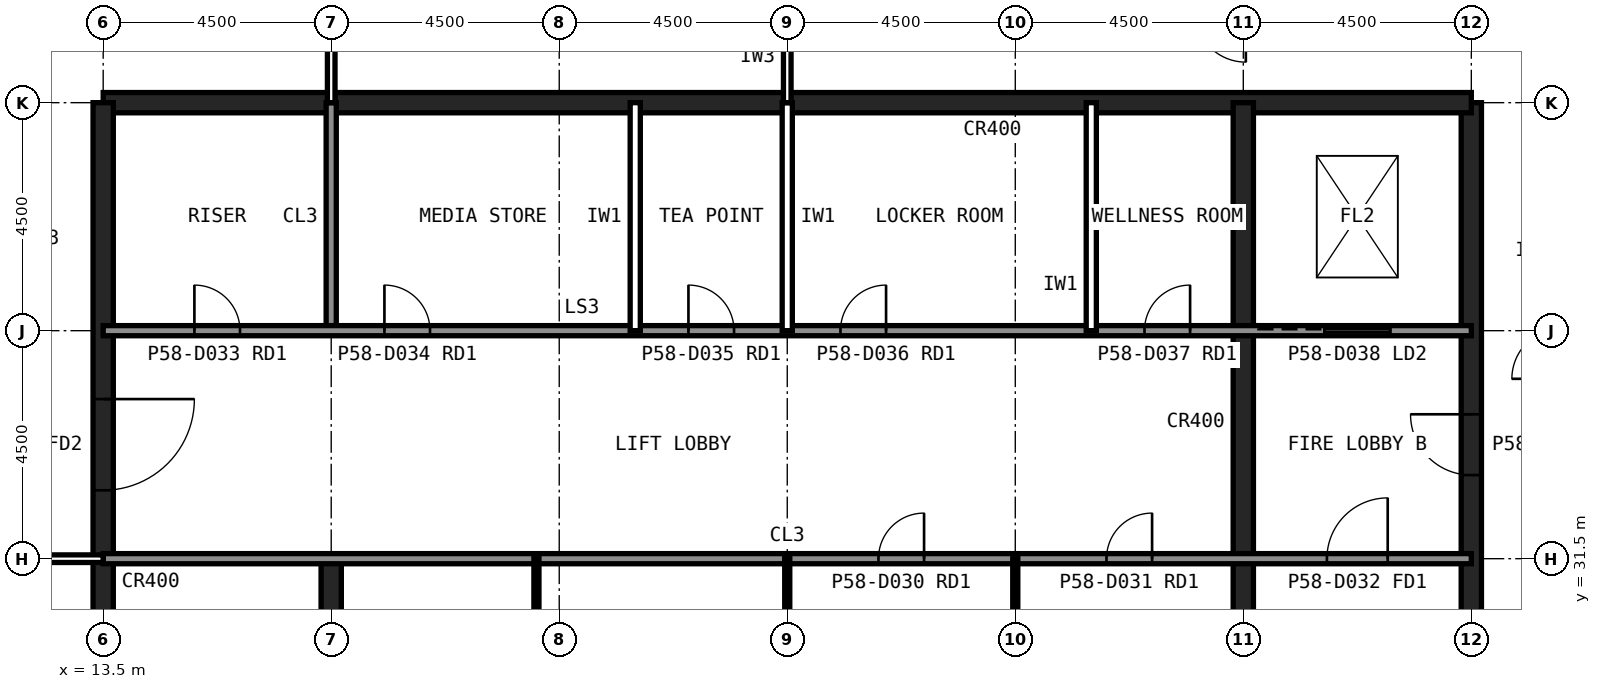
"""IFC4 building model, lengths in metres.
Left out: names, types, materials, properties, quantities, classifications, styles, units other than length and angle.
Written with IfcOpenShell. Run it as: python <this file> out.ifc"""

import sys

from ifc_helpers import new_model, si_unit, direction, frame, frame_2d, origin, place, context, subcontext, project, spatial, rectangle, extrude, element, fill, save


model = new_model("IFC4")
c1 = context("Model", 3, precision=1e-05, world=origin(), true_north=direction((0.0, 1.0)))
c2 = subcontext(c1, "Body", "Model", "MODEL_VIEW")
j1 = project(units=[si_unit("LENGTHUNIT", "METRE"), si_unit("PLANEANGLEUNIT", "RADIAN")], contexts=[c1])
p1 = place(None, origin())
s1 = spatial("IfcSite", under=j1, at=p1, CompositionType="ELEMENT")
p2 = place(p1, origin())
s2 = spatial("IfcBuilding", under=s1, at=p2, CompositionType="ELEMENT")
p3 = place(p2, frame((0.0, 0.0, 246.6)))
s3 = spatial("IfcBuildingStorey", under=s2, at=p3, CompositionType="ELEMENT", Elevation=246.6)
p4 = place(p3, frame((40.5, 13.5, 0.0), z_axis=(0.0, 0.0, 1.0), x_axis=(0.0, 1.0, 0.0)))
e1 = element("IfcWall", 1, at=p4, inside=s3, PredefinedType="SHEAR", context=c2, shape_type="SweptSolid", body=[
    extrude(rectangle(XDim=27.0, YDim=0.4, at=frame_2d((13.5, 0.0))), origin(), (0.0, 0.0, 1.0), 4.0),
])
p5 = place(p4, frame((5.85, 0.0, 0.0)))
e2 = element("IfcOpeningElement", 2, at=p5, cuts=e1, PredefinedType="OPENING", context=c2, shape_type="SweptSolid", body=[
    extrude(rectangle(XDim=1.8, YDim=2.1, at=frame_2d((0.9, 1.05))), frame((0.0, 0.21, 0.0), z_axis=(0.0, -1.0, 0.0), x_axis=(1.0, 0.0, 0.0)), (0.0, 0.0, 1.0), 0.42),
])
p6 = place(p4, frame((19.65, 0.0, 0.0)))
e3 = element("IfcOpeningElement", 3, at=p6, cuts=e1, PredefinedType="OPENING", context=c2, shape_type="SweptSolid", body=[
    extrude(rectangle(XDim=1.2, YDim=2.1, at=frame_2d((0.6, 1.05))), frame((0.0, 0.21, 0.0), z_axis=(0.0, -1.0, 0.0), x_axis=(1.0, 0.0, 0.0)), (0.0, 0.0, 1.0), 0.42),
])
p7 = place(p3, frame((40.5, 40.5, 0.0), z_axis=(0.0, 0.0, 1.0), x_axis=(-1.0, 0.0, 0.0)))
e4 = element("IfcWall", 4, at=p7, inside=s3, PredefinedType="SHEAR", context=c2, shape_type="SweptSolid", body=[
    extrude(rectangle(XDim=27.0, YDim=0.4, at=frame_2d((13.5, 0.0))), origin(), (0.0, 0.0, 1.0), 4.0),
])
p8 = place(p3, frame((13.5, 40.5, 0.0), z_axis=(0.0, 0.0, 1.0), x_axis=(0.0, -1.0, 0.0)))
e5 = element("IfcWall", 5, at=p8, inside=s3, PredefinedType="SHEAR", context=c2, shape_type="SweptSolid", body=[
    extrude(rectangle(XDim=27.0, YDim=0.4, at=frame_2d((13.5, 0.0))), origin(), (0.0, 0.0, 1.0), 4.0),
])
p9 = place(p8, frame((19.65, 0.0, 0.0)))
e6 = element("IfcOpeningElement", 6, at=p9, cuts=e5, PredefinedType="OPENING", context=c2, shape_type="SweptSolid", body=[
    extrude(rectangle(XDim=1.2, YDim=2.1, at=frame_2d((0.6, 1.05))), frame((0.0, 0.21, 0.0), z_axis=(0.0, -1.0, 0.0), x_axis=(1.0, 0.0, 0.0)), (0.0, 0.0, 1.0), 0.42),
])
p10 = place(p8, frame((5.85, 0.0, 0.0)))
e7 = element("IfcOpeningElement", 7, at=p10, cuts=e5, PredefinedType="OPENING", context=c2, shape_type="SweptSolid", body=[
    extrude(rectangle(XDim=1.8, YDim=2.1, at=frame_2d((0.9, 1.05))), frame((0.0, 0.21, 0.0), z_axis=(0.0, -1.0, 0.0), x_axis=(1.0, 0.0, 0.0)), (0.0, 0.0, 1.0), 0.42),
])
p11 = place(p3, frame((18.0, 13.5, 0.0), z_axis=(0.0, 0.0, 1.0), x_axis=(0.0, 1.0, 0.0)))
e8 = element("IfcWall", 8, at=p11, inside=s3, PredefinedType="SHEAR", context=c2, shape_type="SweptSolid", body=[
    extrude(rectangle(XDim=18.0, YDim=0.4, at=frame_2d((9.0, 0.0))), origin(), (0.0, 0.0, 1.0), 4.0),
])
p12 = place(p3, frame((18.0, 36.0, 0.0), z_axis=(0.0, 0.0, 1.0), x_axis=(0.0, 1.0, 0.0)))
e9 = element("IfcWall", 9, at=p12, inside=s3, PredefinedType="SOLIDWALL", context=c2, shape_type="SweptSolid", body=[
    extrude(rectangle(XDim=4.5, YDim=0.2, at=frame_2d((2.25, 0.0))), origin(), (0.0, 0.0, 1.0), 3.84),
])
p13 = place(p3, frame((36.0, 22.5, 0.0), z_axis=(0.0, 0.0, 1.0), x_axis=(0.0, 1.0, 0.0)))
e10 = element("IfcWall", 10, at=p13, inside=s3, PredefinedType="SHEAR", context=c2, shape_type="SweptSolid", body=[
    extrude(rectangle(XDim=18.0, YDim=0.4, at=frame_2d((9.0, 0.0))), origin(), (0.0, 0.0, 1.0), 4.0),
])
p14 = place(p3, frame((13.5, 36.0, 0.0), z_axis=(0.0, 0.0, 1.0), x_axis=(1.0, 0.0, 0.0)))
e11 = element("IfcWall", 11, at=p14, inside=s3, PredefinedType="SOLIDWALL", context=c2, shape_type="SweptSolid", body=[
    extrude(rectangle(XDim=27.0, YDim=0.2, at=frame_2d((13.5, 0.0))), origin(), (0.0, 0.0, 1.0), 3.84),
])
p15 = place(p14, frame((1.8, 0.0, 0.0)))
e12 = element("IfcOpeningElement", 12, at=p15, cuts=e11, PredefinedType="OPENING", context=c2, shape_type="SweptSolid", body=[
    extrude(rectangle(XDim=0.9, YDim=2.1, at=frame_2d((0.45, 1.05))), frame((0.0, 0.11, 0.0), z_axis=(0.0, -1.0, 0.0), x_axis=(1.0, 0.0, 0.0)), (0.0, 0.0, 1.0), 0.22),
])
p16 = place(p14, frame((5.55, 0.0, 0.0)))
e13 = element("IfcOpeningElement", 13, at=p16, cuts=e11, PredefinedType="OPENING", context=c2, shape_type="SweptSolid", body=[
    extrude(rectangle(XDim=0.9, YDim=2.1, at=frame_2d((0.45, 1.05))), frame((0.0, 0.11, 0.0), z_axis=(0.0, -1.0, 0.0), x_axis=(1.0, 0.0, 0.0)), (0.0, 0.0, 1.0), 0.22),
])
p17 = place(p14, frame((11.55, 0.0, 0.0)))
e14 = element("IfcOpeningElement", 14, at=p17, cuts=e11, PredefinedType="OPENING", context=c2, shape_type="SweptSolid", body=[
    extrude(rectangle(XDim=0.9, YDim=2.1, at=frame_2d((0.45, 1.05))), frame((0.0, 0.11, 0.0), z_axis=(0.0, -1.0, 0.0), x_axis=(1.0, 0.0, 0.0)), (0.0, 0.0, 1.0), 0.22),
])
p18 = place(p14, frame((14.55, 0.0, 0.0)))
e15 = element("IfcOpeningElement", 15, at=p18, cuts=e11, PredefinedType="OPENING", context=c2, shape_type="SweptSolid", body=[
    extrude(rectangle(XDim=0.9, YDim=2.1, at=frame_2d((0.45, 1.05))), frame((0.0, 0.11, 0.0), z_axis=(0.0, -1.0, 0.0), x_axis=(1.0, 0.0, 0.0)), (0.0, 0.0, 1.0), 0.22),
])
p19 = place(p14, frame((20.55, 0.0, 0.0)))
e16 = element("IfcOpeningElement", 16, at=p19, cuts=e11, PredefinedType="OPENING", context=c2, shape_type="SweptSolid", body=[
    extrude(rectangle(XDim=0.9, YDim=2.1, at=frame_2d((0.45, 1.05))), frame((0.0, 0.11, 0.0), z_axis=(0.0, -1.0, 0.0), x_axis=(1.0, 0.0, 0.0)), (0.0, 0.0, 1.0), 0.22),
])
p20 = place(p14, frame((24.1, 0.0, 0.0)))
e17 = element("IfcOpeningElement", 17, at=p20, cuts=e11, PredefinedType="OPENING", context=c2, shape_type="SweptSolid", body=[
    extrude(rectangle(XDim=1.3, YDim=2.2, at=frame_2d((0.65, 1.1))), frame((0.0, 0.11, 0.0), z_axis=(0.0, -1.0, 0.0), x_axis=(1.0, 0.0, 0.0)), (0.0, 0.0, 1.0), 0.22),
])
p21 = place(p3, frame((13.5, 31.5, 0.0), z_axis=(0.0, 0.0, 1.0), x_axis=(1.0, 0.0, 0.0)))
e18 = element("IfcWall", 18, at=p21, inside=s3, PredefinedType="SOLIDWALL", context=c2, shape_type="SweptSolid", body=[
    extrude(rectangle(XDim=27.0, YDim=0.2, at=frame_2d((13.5, 0.0))), origin(), (0.0, 0.0, 1.0), 3.84),
])
p22 = place(p21, frame((24.15, 0.0, 0.0)))
e19 = element("IfcOpeningElement", 19, at=p22, cuts=e18, PredefinedType="OPENING", context=c2, shape_type="SweptSolid", body=[
    extrude(rectangle(XDim=1.2, YDim=2.1, at=frame_2d((0.6, 1.05))), frame((0.0, 0.11, 0.0), z_axis=(0.0, -1.0, 0.0), x_axis=(1.0, 0.0, 0.0)), (0.0, 0.0, 1.0), 0.22),
])
p23 = place(p21, frame((15.3, 0.0, 0.0)))
e20 = element("IfcOpeningElement", 20, at=p23, cuts=e18, PredefinedType="OPENING", context=c2, shape_type="SweptSolid", body=[
    extrude(rectangle(XDim=0.9, YDim=2.1, at=frame_2d((0.45, 1.05))), frame((0.0, 0.11, 0.0), z_axis=(0.0, -1.0, 0.0), x_axis=(1.0, 0.0, 0.0)), (0.0, 0.0, 1.0), 0.22),
])
p24 = place(p21, frame((19.8, 0.0, 0.0)))
e21 = element("IfcOpeningElement", 21, at=p24, cuts=e18, PredefinedType="OPENING", context=c2, shape_type="SweptSolid", body=[
    extrude(rectangle(XDim=0.9, YDim=2.1, at=frame_2d((0.45, 1.05))), frame((0.0, 0.11, 0.0), z_axis=(0.0, -1.0, 0.0), x_axis=(1.0, 0.0, 0.0)), (0.0, 0.0, 1.0), 0.22),
])
for number, where, z_axis, x_axis in (
    (22, (24.0, 36.0, 0.0), (0.0, 0.0, 1.0), (0.0, 1.0, 0.0)),
    (23, (27.0, 36.0, 0.0), (0.0, 0.0, 1.0), (0.0, 1.0, 0.0)),
    (24, (33.0, 36.0, 0.0), (0.0, 0.0, 1.0), (0.0, 1.0, 0.0)),
):
    element("IfcWall", number, at=place(p3, frame(where, z_axis=z_axis, x_axis=x_axis)), inside=s3, PredefinedType="PARTITIONING", context=c2, shape_type="SweptSolid", body=[
        extrude(rectangle(XDim=4.5, YDim=0.2, at=frame_2d((2.25, 0.0))), origin(), (0.0, 0.0, 1.0), 3.84),
    ])
for number, where, z_axis, x_axis in (
    (25, (22.05, 22.5, 0.0), (0.0, 0.0, 1.0), (0.0, 1.0, 0.0)),
    (26, (27.0, 22.5, 0.0), (0.0, 0.0, 1.0), (0.0, 1.0, 0.0)),
    (27, (31.5, 22.5, 0.0), (0.0, 0.0, 1.0), (0.0, 1.0, 0.0)),
):
    element("IfcWall", number, at=place(p3, frame(where, z_axis=z_axis, x_axis=x_axis)), inside=s3, PredefinedType="PLUMBINGWALL", context=c2, shape_type="SweptSolid", body=[
        extrude(rectangle(XDim=9.0, YDim=0.1, at=frame_2d((4.5, 0.0))), origin(), (0.0, 0.0, 1.0), 3.84),
    ])
p25 = place(p3, frame((27.0, 40.5, 0.0), z_axis=(0.0, 0.0, 1.0), x_axis=(0.0, 1.0, 0.0)))
e28 = element("IfcWall", 28, at=p25, inside=s3, PredefinedType="PARTITIONING", context=c2, shape_type="SweptSolid", body=[
    extrude(rectangle(XDim=4.5, YDim=0.15, at=frame_2d((2.25, 0.0))), origin(), (0.0, 0.0, 1.0), 2.989),
])
p26 = place(p25, frame((1.75, 0.0, 0.0)))
e29 = element("IfcOpeningElement", 29, at=p26, cuts=e28, PredefinedType="OPENING", context=c2, shape_type="SweptSolid", body=[
    extrude(rectangle(XDim=1.0, YDim=2.1, at=frame_2d((0.5, 1.05))), frame((0.0, 0.085, 0.0), z_axis=(0.0, -1.0, 0.0), x_axis=(1.0, 0.0, 0.0)), (0.0, 0.0, 1.0), 0.17),
])
p27 = place(p3, frame((18.0, 45.0, 0.0), z_axis=(0.0, 0.0, 1.0), x_axis=(0.0, -1.0, 0.0)))
e30 = element("IfcWall", 30, at=p27, inside=s3, PredefinedType="PARTITIONING", context=c2, shape_type="SweptSolid", body=[
    extrude(rectangle(XDim=4.5, YDim=0.15, at=frame_2d((2.25, 0.0))), origin(), (0.0, 0.0, 1.0), 2.989),
])
p28 = place(p3, frame((13.5, 31.5, 0.0), z_axis=(0.0, 0.0, 1.0), x_axis=(-1.0, 0.0, 0.0)))
e31 = element("IfcWall", 31, at=p28, inside=s3, PredefinedType="PARTITIONING", context=c2, shape_type="SweptSolid", body=[
    extrude(rectangle(XDim=3.6, YDim=0.15, at=frame_2d((1.8, 0.0))), origin(), (0.0, 0.0, 1.0), 2.989),
])
p29 = place(p10, origin())
e32 = element("IfcDoor", 32, at=p29, inside=s3, OperationType="SINGLE_SWING_LEFT", PredefinedType="DOOR", context=c2, shape_type="SweptSolid", body=[
    extrude(rectangle(XDim=1.8, YDim=2.1, at=frame_2d((0.9, 1.05))), frame((0.0, 0.025, 0.0), z_axis=(0.0, -1.0, 0.0), x_axis=(1.0, 0.0, 0.0)), (0.0, 0.0, 1.0), 0.05),
])
fill(e7, e32)
p30 = place(p6, origin())
e33 = element("IfcDoor", 33, at=p30, inside=s3, OperationType="SINGLE_SWING_RIGHT", PredefinedType="DOOR", context=c2, shape_type="SweptSolid", body=[
    extrude(rectangle(XDim=1.2, YDim=2.1, at=frame_2d((0.6, 1.05))), frame((0.0, 0.025, 0.0), z_axis=(0.0, -1.0, 0.0), x_axis=(1.0, 0.0, 0.0)), (0.0, 0.0, 1.0), 0.05),
])
fill(e3, e33)
p31 = place(p22, origin())
e34 = element("IfcDoor", 34, at=p31, inside=s3, OperationType="SINGLE_SWING_RIGHT", PredefinedType="DOOR", context=c2, shape_type="SweptSolid", body=[
    extrude(rectangle(XDim=1.2, YDim=2.1, at=frame_2d((0.6, 1.05))), frame((0.0, 0.025, 0.0), z_axis=(0.0, -1.0, 0.0), x_axis=(1.0, 0.0, 0.0)), (0.0, 0.0, 1.0), 0.05),
])
fill(e19, e34)
p32 = place(p23, origin())
e35 = element("IfcDoor", 35, at=p32, inside=s3, OperationType="SINGLE_SWING_RIGHT", PredefinedType="DOOR", context=c2, shape_type="SweptSolid", body=[
    extrude(rectangle(XDim=0.9, YDim=2.1, at=frame_2d((0.45, 1.05))), frame((0.0, 0.025, 0.0), z_axis=(0.0, -1.0, 0.0), x_axis=(1.0, 0.0, 0.0)), (0.0, 0.0, 1.0), 0.05),
])
fill(e20, e35)
p33 = place(p24, origin())
e36 = element("IfcDoor", 36, at=p33, inside=s3, OperationType="SINGLE_SWING_RIGHT", PredefinedType="DOOR", context=c2, shape_type="SweptSolid", body=[
    extrude(rectangle(XDim=0.9, YDim=2.1, at=frame_2d((0.45, 1.05))), frame((0.0, 0.025, 0.0), z_axis=(0.0, -1.0, 0.0), x_axis=(1.0, 0.0, 0.0)), (0.0, 0.0, 1.0), 0.05),
])
fill(e21, e36)
p34 = place(p15, origin())
e37 = element("IfcDoor", 37, at=p34, inside=s3, OperationType="SINGLE_SWING_LEFT", PredefinedType="DOOR", context=c2, shape_type="SweptSolid", body=[
    extrude(rectangle(XDim=0.9, YDim=2.1, at=frame_2d((0.45, 1.05))), frame((0.0, 0.025, 0.0), z_axis=(0.0, -1.0, 0.0), x_axis=(1.0, 0.0, 0.0)), (0.0, 0.0, 1.0), 0.05),
])
fill(e12, e37)
p35 = place(p16, origin())
e38 = element("IfcDoor", 38, at=p35, inside=s3, OperationType="SINGLE_SWING_LEFT", PredefinedType="DOOR", context=c2, shape_type="SweptSolid", body=[
    extrude(rectangle(XDim=0.9, YDim=2.1, at=frame_2d((0.45, 1.05))), frame((0.0, 0.025, 0.0), z_axis=(0.0, -1.0, 0.0), x_axis=(1.0, 0.0, 0.0)), (0.0, 0.0, 1.0), 0.05),
])
fill(e13, e38)
p36 = place(p17, origin())
e39 = element("IfcDoor", 39, at=p36, inside=s3, OperationType="SINGLE_SWING_LEFT", PredefinedType="DOOR", context=c2, shape_type="SweptSolid", body=[
    extrude(rectangle(XDim=0.9, YDim=2.1, at=frame_2d((0.45, 1.05))), frame((0.0, 0.025, 0.0), z_axis=(0.0, -1.0, 0.0), x_axis=(1.0, 0.0, 0.0)), (0.0, 0.0, 1.0), 0.05),
])
fill(e14, e39)
p37 = place(p18, origin())
e40 = element("IfcDoor", 40, at=p37, inside=s3, OperationType="SINGLE_SWING_RIGHT", PredefinedType="DOOR", context=c2, shape_type="SweptSolid", body=[
    extrude(rectangle(XDim=0.9, YDim=2.1, at=frame_2d((0.45, 1.05))), frame((0.0, 0.025, 0.0), z_axis=(0.0, -1.0, 0.0), x_axis=(1.0, 0.0, 0.0)), (0.0, 0.0, 1.0), 0.05),
])
fill(e15, e40)
p38 = place(p19, origin())
e41 = element("IfcDoor", 41, at=p38, inside=s3, OperationType="SINGLE_SWING_RIGHT", PredefinedType="DOOR", context=c2, shape_type="SweptSolid", body=[
    extrude(rectangle(XDim=0.9, YDim=2.1, at=frame_2d((0.45, 1.05))), frame((0.0, 0.025, 0.0), z_axis=(0.0, -1.0, 0.0), x_axis=(1.0, 0.0, 0.0)), (0.0, 0.0, 1.0), 0.05),
])
fill(e16, e41)
p39 = place(p20, origin())
e42 = element("IfcDoor", 42, at=p39, inside=s3, OperationType="SLIDING_TO_LEFT", PredefinedType="DOOR", context=c2, shape_type="SweptSolid", body=[
    extrude(rectangle(XDim=1.3, YDim=2.2, at=frame_2d((0.65, 1.1))), frame((0.0, 0.025, 0.0), z_axis=(0.0, -1.0, 0.0), x_axis=(1.0, 0.0, 0.0)), (0.0, 0.0, 1.0), 0.05),
])
fill(e17, e42)
save(model, sys.argv[1])
